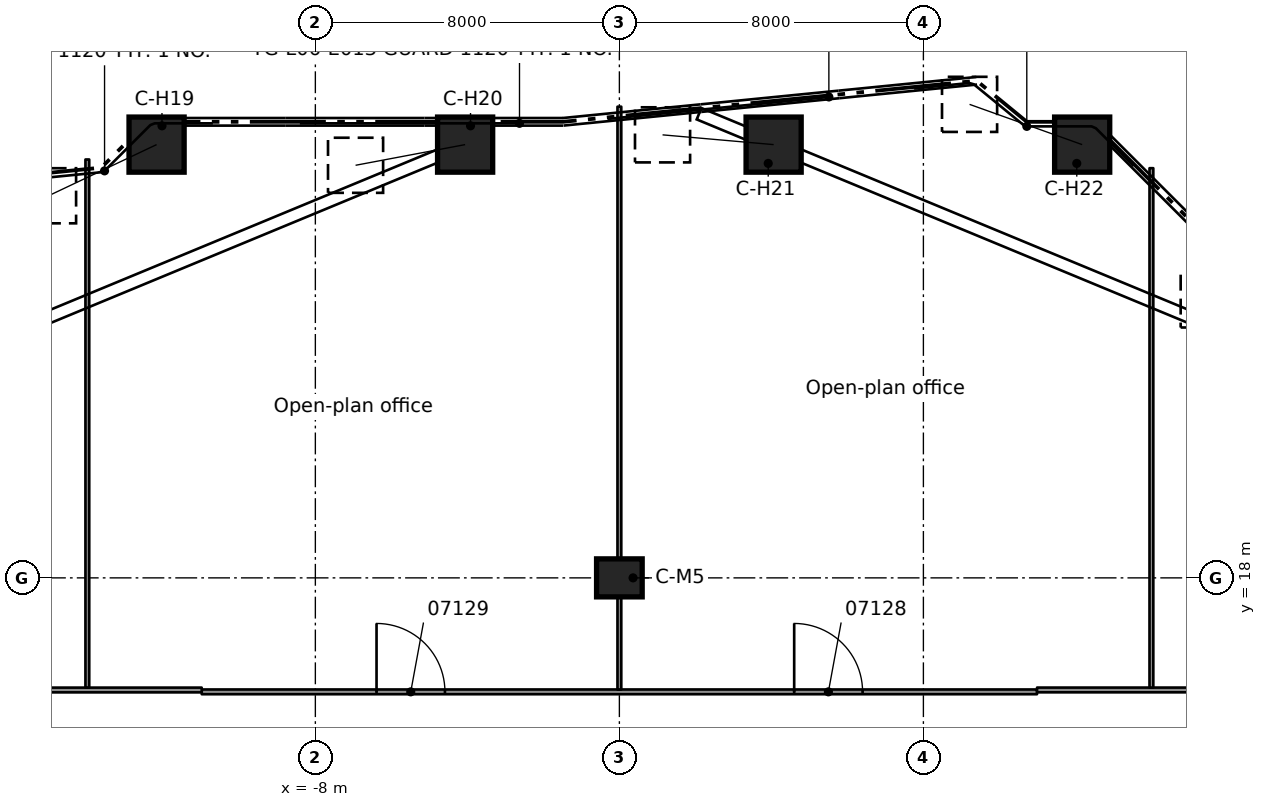
"""IFC4 building model, lengths in metres.
Left out: names, types, materials, properties, quantities, classifications, styles, units other than length and angle.
Written with IfcOpenShell. Run it as: python <this file> out.ifc"""

import sys

from ifc_helpers import new_model, si_unit, direction, frame, frame_2d, origin, origin_2d, place, context, subcontext, project, spatial, rectangle, extrude, element, fill, save


model = new_model("IFC4")
c1 = context("Model", 3, precision=1e-05, world=origin(), true_north=direction((0.0, 1.0)))
c2 = subcontext(c1, "Body", "Model", "MODEL_VIEW")
j1 = project(units=[si_unit("LENGTHUNIT", "METRE"), si_unit("PLANEANGLEUNIT", "RADIAN")], contexts=[c1])
p1 = place(None, origin())
s1 = spatial("IfcSite", under=j1, at=p1, CompositionType="ELEMENT")
p2 = place(p1, origin())
s2 = spatial("IfcBuilding", under=s1, at=p2, CompositionType="ELEMENT")
p3 = place(p2, frame((0.0, 0.0, 33.3)))
s3 = spatial("IfcBuildingStorey", under=s2, at=p3, CompositionType="ELEMENT", Elevation=33.3)
p4 = place(p3, frame((-12.178, 29.4, 0.53), z_axis=(-0.660215598589, -0.312560635038, 0.682950373603), x_axis=(0.427892823623, -0.903829481424, 0.0)))
e1 = element("IfcColumn", 1, at=p4, inside=s3, PredefinedType="COLUMN", context=c2, shape_type="SweptSolid", body=[
    extrude(rectangle(XDim=1.45, YDim=1.45, at=origin_2d()), origin(), (0.0, 0.0, 1.0), 4.306),
])
p5 = place(p3, frame((-4.059, 29.4, 0.508), z_axis=(-0.68901191234, -0.130006651481, 0.712994288353), x_axis=(0.185413924034, -0.98266050942, 0.0)))
e2 = element("IfcColumn", 2, at=p5, inside=s3, PredefinedType="COLUMN", context=c2, shape_type="SweptSolid", body=[
    extrude(rectangle(XDim=1.45, YDim=1.45, at=origin_2d()), origin(), (0.0, 0.0, 1.0), 4.184),
])
p6 = place(p3, frame((4.059, 29.4, 0.508), z_axis=(-0.698558188668, 0.061436713661, 0.712910925193), x_axis=(-0.08760971228, -0.99615487667, 0.0)))
e3 = element("IfcColumn", 3, at=p6, inside=s3, PredefinedType="COLUMN", context=c2, shape_type="SweptSolid", body=[
    extrude(rectangle(XDim=1.45, YDim=1.45, at=origin_2d()), origin(), (0.0, 0.0, 1.0), 4.185),
])
p7 = place(p3, frame((12.178, 29.4, 0.53), z_axis=(-0.687967306264, 0.24591316534, 0.682808685229), x_axis=(-0.33659198018, -0.941650592778, 0.0)))
e4 = element("IfcColumn", 4, at=p7, inside=s3, PredefinedType="COLUMN", context=c2, shape_type="SweptSolid", body=[
    extrude(rectangle(XDim=1.45, YDim=1.45, at=origin_2d()), origin(), (0.0, 0.0, 1.0), 4.307),
])
p8 = place(p3, frame((17.919, 23.659, 0.508), z_axis=(-0.579239562537, 0.395280825563, 0.712905742812), x_axis=(-0.563672389997, -0.825998448397, 0.0)))
e5 = element("IfcColumn", 5, at=p8, inside=s3, PredefinedType="COLUMN", context=c2, shape_type="SweptSolid", body=[
    extrude(rectangle(XDim=1.45, YDim=1.45, at=origin_2d()), origin(), (0.0, 0.0, 1.0), 4.185),
])
p9 = place(p3, frame((0.0, 18.0, 0.0), z_axis=(0.0, 0.0, 1.0), x_axis=(1.0, 0.0, 0.0)))
e6 = element("IfcColumn", 6, at=p9, inside=s3, PredefinedType="COLUMN", context=c2, shape_type="SweptSolid", body=[
    extrude(rectangle(XDim=1.2, YDim=1.0, at=origin_2d()), origin(), (0.0, 0.0, 1.0), 4.0),
])
p10 = place(p3, frame((-10.99, 15.001, 0.0), z_axis=(0.0, 0.0, 1.0), x_axis=(1.0, 0.0, 0.0)))
e7 = element("IfcWall", 7, at=p10, inside=s3, PredefinedType="PARTITIONING", context=c2, shape_type="SweptSolid", body=[
    extrude(rectangle(XDim=21.98, YDim=0.125, at=frame_2d((10.99, 0.0))), origin(), (0.0, 0.0, 1.0), 3.56),
])
p11 = place(p10, frame((15.59, 0.0, 0.0)))
e8 = element("IfcOpeningElement", 8, at=p11, cuts=e7, PredefinedType="OPENING", context=c2, shape_type="SweptSolid", body=[
    extrude(rectangle(XDim=1.8, YDim=2.1, at=frame_2d((0.9, 1.05))), frame((0.0, 0.073, 0.0), z_axis=(0.0, -1.0, 0.0), x_axis=(1.0, 0.0, 0.0)), (0.0, 0.0, 1.0), 0.145),
])
p12 = place(p10, frame((4.6, 0.0, 0.0)))
e9 = element("IfcOpeningElement", 9, at=p12, cuts=e7, PredefinedType="OPENING", context=c2, shape_type="SweptSolid", body=[
    extrude(rectangle(XDim=1.8, YDim=2.1, at=frame_2d((0.9, 1.05))), frame((0.0, 0.073, 0.0), z_axis=(0.0, -1.0, 0.0), x_axis=(1.0, 0.0, 0.0)), (0.0, 0.0, 1.0), 0.145),
])
p13 = place(p3, frame((-25.998, 15.05, 0.0), z_axis=(0.0, 0.0, 1.0), x_axis=(1.0, 0.0, 0.0)))
e10 = element("IfcWall", 10, at=p13, inside=s3, PredefinedType="PARTITIONING", context=c2, shape_type="SweptSolid", body=[
    extrude(rectangle(XDim=15.007, YDim=0.125, at=frame_2d((7.503, 0.0))), origin(), (0.0, 0.0, 1.0), 3.56),
])
p14 = place(p13, frame((7.048, 0.0, 0.0)))
e11 = element("IfcOpeningElement", 11, at=p14, cuts=e10, PredefinedType="OPENING", context=c2, shape_type="SweptSolid", body=[
    extrude(rectangle(XDim=1.8, YDim=2.1, at=frame_2d((0.9, 1.05))), frame((0.0, 0.073, 0.0), z_axis=(0.0, -1.0, 0.0), x_axis=(1.0, 0.0, 0.0)), (0.0, 0.0, 1.0), 0.145),
])
p15 = place(p3, frame((10.991, 15.051, 0.0), z_axis=(0.0, 0.0, 1.0), x_axis=(1.0, 0.0, 0.0)))
e12 = element("IfcWall", 12, at=p15, inside=s3, PredefinedType="PARTITIONING", context=c2, shape_type="SweptSolid", body=[
    extrude(rectangle(XDim=10.997, YDim=0.125, at=frame_2d((5.499, 0.0))), origin(), (0.0, 0.0, 1.0), 3.56),
])
p16 = place(p3, frame((14.0, 15.114, 0.0), z_axis=(0.0, 0.0, 1.0), x_axis=(0.0, 1.0, 0.0)))
e13 = element("IfcWall", 13, at=p16, inside=s3, PredefinedType="PARTITIONING", context=c2, shape_type="SweptSolid", body=[
    extrude(rectangle(XDim=13.666, YDim=0.1, at=frame_2d((6.833, 0.0))), origin(), (0.0, 0.0, 1.0), 3.56),
])
p17 = place(p3, frame((0.0, 15.063, 0.0), z_axis=(0.0, 0.0, 1.0), x_axis=(0.0, 1.0, 0.0)))
e14 = element("IfcWall", 14, at=p17, inside=s3, PredefinedType="PARTITIONING", context=c2, shape_type="SweptSolid", body=[
    extrude(rectangle(XDim=15.335, YDim=0.1, at=frame_2d((7.667, 0.0))), origin(), (0.0, 0.0, 1.0), 3.56),
])
p18 = place(p3, frame((-14.0, 15.114, 0.0), z_axis=(0.0, 0.0, 1.0), x_axis=(0.0, 1.0, 0.0)))
e15 = element("IfcWall", 15, at=p18, inside=s3, PredefinedType="PARTITIONING", context=c2, shape_type="SweptSolid", body=[
    extrude(rectangle(XDim=13.895, YDim=0.1, at=frame_2d((6.948, 0.0))), origin(), (0.0, 0.0, 1.0), 3.56),
])
p19 = place(p11, origin())
e16 = element("IfcDoor", 16, at=p19, inside=s3, OperationType="DOUBLE_DOOR_SINGLE_SWING", PredefinedType="DOOR", context=c2, shape_type="SweptSolid", body=[
    extrude(rectangle(XDim=1.8, YDim=2.1, at=frame_2d((0.9, 1.05))), frame((0.0, 0.025, 0.0), z_axis=(0.0, -1.0, 0.0), x_axis=(1.0, 0.0, 0.0)), (0.0, 0.0, 1.0), 0.05),
])
fill(e8, e16)
p20 = place(p12, origin())
e17 = element("IfcDoor", 17, at=p20, inside=s3, OperationType="DOUBLE_DOOR_SINGLE_SWING", PredefinedType="DOOR", context=c2, shape_type="SweptSolid", body=[
    extrude(rectangle(XDim=1.8, YDim=2.1, at=frame_2d((0.9, 1.05))), frame((0.0, 0.025, 0.0), z_axis=(0.0, -1.0, 0.0), x_axis=(1.0, 0.0, 0.0)), (0.0, 0.0, 1.0), 0.05),
])
fill(e9, e17)
save(model, sys.argv[1])
